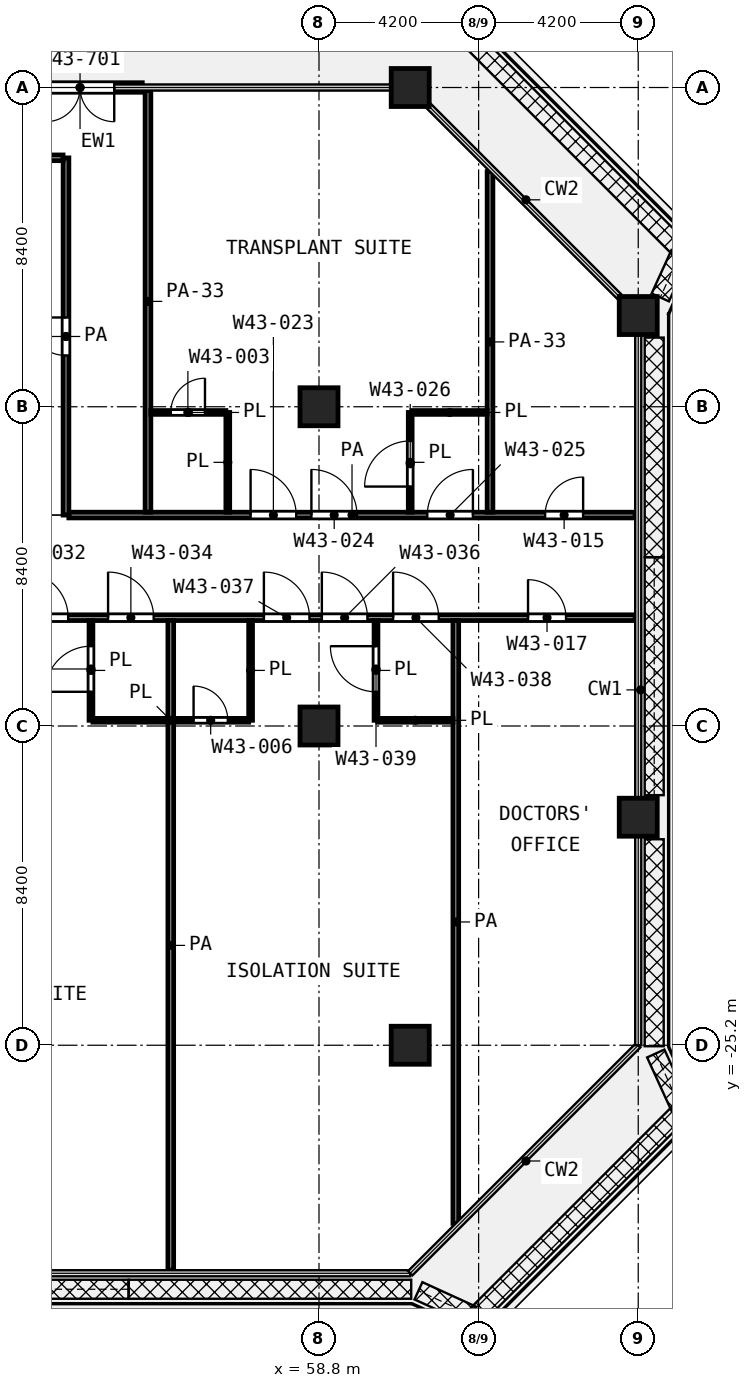
"""IFC4 building model, lengths in metres.
Left out: names, types, materials, properties, quantities, classifications, styles, units other than length and angle.
Written with IfcOpenShell. Run it as: python <this file> out.ifc"""

import sys

from ifc_helpers import new_model, si_unit, direction, frame, frame_2d, origin, origin_2d, place, context, subcontext, project, spatial, rectangle, extrude, element, fill, save


model = new_model("IFC4")
c1 = context("Model", 3, precision=1e-05, world=origin(), true_north=direction((0.0, 1.0)))
c2 = subcontext(c1, "Body", "Model", "MODEL_VIEW")
j1 = project(units=[si_unit("LENGTHUNIT", "METRE"), si_unit("PLANEANGLEUNIT", "RADIAN")], contexts=[c1])
p1 = place(None, origin())
s1 = spatial("IfcSite", under=j1, at=p1, CompositionType="ELEMENT")
p2 = place(p1, origin())
s2 = spatial("IfcBuilding", under=s1, at=p2, CompositionType="ELEMENT")
p3 = place(p2, frame((0.0, 0.0, 187.8)))
s3 = spatial("IfcBuildingStorey", under=s2, at=p3, CompositionType="ELEMENT", Elevation=187.8)
for number, where, z_axis, x_axis in (
    (1, (61.2, 0.0, 0.0), (0.0, 0.0, 1.0), (1.0, 0.0, 0.0)),
    (2, (67.2, -6.0, 0.0), (0.0, 0.0, 1.0), (1.0, 0.0, 0.0)),
    (3, (58.8, -8.4, 0.0), (0.0, 0.0, 1.0), (1.0, 0.0, 0.0)),
    (4, (58.8, -16.8, 0.0), (0.0, 0.0, 1.0), (1.0, 0.0, 0.0)),
    (5, (67.2, -19.2, 0.0), (0.0, 0.0, 1.0), (1.0, 0.0, 0.0)),
    (6, (61.2, -25.2, 0.0), (0.0, 0.0, 1.0), (1.0, 0.0, 0.0)),
):
    element("IfcColumn", number, at=place(p3, frame(where, z_axis=z_axis, x_axis=x_axis)), inside=s3, PredefinedType="COLUMN", context=c2, shape_type="SweptSolid", body=[
        extrude(rectangle(XDim=1.0, YDim=1.0, at=origin_2d()), origin(), (0.0, 0.0, 1.0), 4.2),
    ])
p4 = place(p3, frame((54.15, 0.0, 0.0), z_axis=(0.0, 0.0, 1.0), x_axis=(-1.0, 0.0, 0.0)))
e7 = element("IfcWall", 7, at=p4, inside=s3, PredefinedType="SOLIDWALL", context=c2, shape_type="SweptSolid", body=[
    extrude(rectangle(XDim=3.275, YDim=0.25, at=frame_2d((1.637, 0.0))), origin(), (0.0, 0.0, 1.0), 2.58),
])
p5 = place(p4, frame((0.738, 0.0, 0.0)))
e8 = element("IfcOpeningElement", 8, at=p5, cuts=e7, PredefinedType="OPENING", context=c2, shape_type="SweptSolid", body=[
    extrude(rectangle(XDim=1.8, YDim=2.1, at=frame_2d((0.9, 1.05))), frame((0.0, 0.135, 0.0), z_axis=(0.0, -1.0, 0.0), x_axis=(1.0, 0.0, 0.0)), (0.0, 0.0, 1.0), 0.27),
])
p6 = place(p3, frame((52.85, -16.65, 0.0), z_axis=(0.0, 0.0, 1.0), x_axis=(1.0, 0.0, 0.0)))
e9 = element("IfcWall", 9, at=p6, inside=s3, PredefinedType="PARTITIONING", context=c2, shape_type="SweptSolid", body=[
    extrude(rectangle(XDim=4.1, YDim=0.1, at=frame_2d((2.05, 0.0))), origin(), (0.0, 0.0, 1.0), 3.6),
])
p7 = place(p6, frame((2.65, 0.0, 0.0)))
e10 = element("IfcOpeningElement", 10, at=p7, cuts=e9, PredefinedType="OPENING", context=c2, shape_type="SweptSolid", body=[
    extrude(rectangle(XDim=0.9, YDim=2.1, at=frame_2d((0.45, 1.05))), frame((0.0, 0.06, 0.0), z_axis=(0.0, -1.0, 0.0), x_axis=(1.0, 0.0, 0.0)), (0.0, 0.0, 1.0), 0.12),
])
p8 = place(p3, frame((60.35, -16.65, 0.0), z_axis=(0.0, 0.0, 1.0), x_axis=(1.0, 0.0, 0.0)))
e11 = element("IfcWall", 11, at=p8, inside=s3, PredefinedType="PARTITIONING", context=c2, shape_type="SweptSolid", body=[
    extrude(rectangle(XDim=1.975, YDim=0.1, at=frame_2d((0.987, 0.0))), origin(), (0.0, 0.0, 1.0), 3.6),
])
p9 = place(p3, frame((54.375, -8.55, 0.0), z_axis=(0.0, 0.0, 1.0), x_axis=(1.0, 0.0, 0.0)))
e12 = element("IfcWall", 12, at=p9, inside=s3, PredefinedType="PARTITIONING", context=c2, shape_type="SweptSolid", body=[
    extrude(rectangle(XDim=1.975, YDim=0.1, at=frame_2d((0.988, 0.0))), origin(), (0.0, 0.0, 1.0), 3.6),
])
p10 = place(p9, frame((0.525, 0.0, 0.0)))
e13 = element("IfcOpeningElement", 13, at=p10, cuts=e12, PredefinedType="OPENING", context=c2, shape_type="SweptSolid", body=[
    extrude(rectangle(XDim=0.9, YDim=2.1, at=frame_2d((0.45, 1.05))), frame((0.0, 0.06, 0.0), z_axis=(0.0, -1.0, 0.0), x_axis=(1.0, 0.0, 0.0)), (0.0, 0.0, 1.0), 0.12),
])
p11 = place(p3, frame((61.25, -8.55, 0.0), z_axis=(0.0, 0.0, 1.0), x_axis=(1.0, 0.0, 0.0)))
e14 = element("IfcWall", 14, at=p11, inside=s3, PredefinedType="PARTITIONING", context=c2, shape_type="SweptSolid", body=[
    extrude(rectangle(XDim=1.975, YDim=0.1, at=frame_2d((0.988, 0.0))), origin(), (0.0, 0.0, 1.0), 3.6),
])
p12 = place(p3, frame((52.8, -16.65, 0.0), z_axis=(0.0, 0.0, 1.0), x_axis=(0.0, 1.0, 0.0)))
e15 = element("IfcWall", 15, at=p12, inside=s3, PredefinedType="PARTITIONING", context=c2, shape_type="SweptSolid", body=[
    extrude(rectangle(XDim=2.625, YDim=0.1, at=frame_2d((1.312, 0.0))), origin(), (0.0, 0.0, 1.0), 3.6),
])
p13 = place(p12, frame((0.75, 0.0, 0.0)))
e16 = element("IfcOpeningElement", 16, at=p13, cuts=e15, PredefinedType="OPENING", context=c2, shape_type="SweptSolid", body=[
    extrude(rectangle(XDim=1.2, YDim=2.1, at=frame_2d((0.6, 1.05))), frame((0.0, 0.06, 0.0), z_axis=(0.0, -1.0, 0.0), x_axis=(1.0, 0.0, 0.0)), (0.0, 0.0, 1.0), 0.12),
])
for number, where, z_axis, x_axis in (
    (17, (56.4, -11.175, 0.0), (0.0, 0.0, 1.0), (0.0, 1.0, 0.0)),
    (18, (57.0, -16.65, 0.0), (0.0, 0.0, 1.0), (0.0, 1.0, 0.0)),
):
    element("IfcWall", number, at=place(p3, frame(where, z_axis=z_axis, x_axis=x_axis)), inside=s3, PredefinedType="PARTITIONING", context=c2, shape_type="SweptSolid", body=[
        extrude(rectangle(XDim=2.625, YDim=0.1, at=frame_2d((1.312, 0.0))), origin(), (0.0, 0.0, 1.0), 3.6),
    ])
p14 = place(p3, frame((60.3, -16.65, 0.0), z_axis=(0.0, 0.0, 1.0), x_axis=(0.0, 1.0, 0.0)))
e19 = element("IfcWall", 19, at=p14, inside=s3, PredefinedType="PARTITIONING", context=c2, shape_type="SweptSolid", body=[
    extrude(rectangle(XDim=2.625, YDim=0.1, at=frame_2d((1.312, 0.0))), origin(), (0.0, 0.0, 1.0), 3.6),
])
p15 = place(p14, frame((0.75, 0.0, 0.0)))
e20 = element("IfcOpeningElement", 20, at=p15, cuts=e19, PredefinedType="OPENING", context=c2, shape_type="SweptSolid", body=[
    extrude(rectangle(XDim=1.2, YDim=2.1, at=frame_2d((0.6, 1.05))), frame((0.0, 0.06, 0.0), z_axis=(0.0, -1.0, 0.0), x_axis=(1.0, 0.0, 0.0)), (0.0, 0.0, 1.0), 0.12),
])
p16 = place(p3, frame((61.2, -11.175, 0.0), z_axis=(0.0, 0.0, 1.0), x_axis=(0.0, 1.0, 0.0)))
e21 = element("IfcWall", 21, at=p16, inside=s3, PredefinedType="PARTITIONING", context=c2, shape_type="SweptSolid", body=[
    extrude(rectangle(XDim=2.625, YDim=0.1, at=frame_2d((1.312, 0.0))), origin(), (0.0, 0.0, 1.0), 3.6),
])
p17 = place(p16, frame((0.675, 0.0, 0.0)))
e22 = element("IfcOpeningElement", 22, at=p17, cuts=e21, PredefinedType="OPENING", context=c2, shape_type="SweptSolid", body=[
    extrude(rectangle(XDim=1.2, YDim=2.1, at=frame_2d((0.6, 1.05))), frame((0.0, 0.06, 0.0), z_axis=(0.0, -1.0, 0.0), x_axis=(1.0, 0.0, 0.0)), (0.0, 0.0, 1.0), 0.12),
])
p18 = place(p3, frame((29.4, -13.95, 0.0), z_axis=(0.0, 0.0, 1.0), x_axis=(1.0, 0.0, 0.0)))
e23 = element("IfcWall", 23, at=p18, inside=s3, PredefinedType="PARTITIONING", context=c2, shape_type="SweptSolid", body=[
    extrude(rectangle(XDim=37.72, YDim=0.15, at=frame_2d((18.86, 0.0))), origin(), (0.0, 0.0, 1.0), 3.6),
])
p19 = place(p18, frame((1.6, 0.0, 0.0)))
e24 = element("IfcOpeningElement", 24, at=p19, cuts=e23, PredefinedType="OPENING", context=c2, shape_type="SweptSolid", body=[
    extrude(rectangle(XDim=1.0, YDim=2.1, at=frame_2d((0.5, 1.05))), frame((0.0, 0.085, 0.0), z_axis=(0.0, -1.0, 0.0), x_axis=(1.0, 0.0, 0.0)), (0.0, 0.0, 1.0), 0.17),
])
p20 = place(p18, frame((6.0, 0.0, 0.0)))
e25 = element("IfcOpeningElement", 25, at=p20, cuts=e23, PredefinedType="OPENING", context=c2, shape_type="SweptSolid", body=[
    extrude(rectangle(XDim=1.2, YDim=2.1, at=frame_2d((0.6, 1.05))), frame((0.0, 0.085, 0.0), z_axis=(0.0, -1.0, 0.0), x_axis=(1.0, 0.0, 0.0)), (0.0, 0.0, 1.0), 0.17),
])
p21 = place(p18, frame((12.975, 0.0, 0.0)))
e26 = element("IfcOpeningElement", 26, at=p21, cuts=e23, PredefinedType="OPENING", context=c2, shape_type="SweptSolid", body=[
    extrude(rectangle(XDim=1.2, YDim=2.1, at=frame_2d((0.6, 1.05))), frame((0.0, 0.085, 0.0), z_axis=(0.0, -1.0, 0.0), x_axis=(1.0, 0.0, 0.0)), (0.0, 0.0, 1.0), 0.17),
])
p22 = place(p18, frame((11.45, 0.0, 0.0)))
e27 = element("IfcOpeningElement", 27, at=p22, cuts=e23, PredefinedType="OPENING", context=c2, shape_type="SweptSolid", body=[
    extrude(rectangle(XDim=1.2, YDim=2.1, at=frame_2d((0.6, 1.05))), frame((0.0, 0.085, 0.0), z_axis=(0.0, -1.0, 0.0), x_axis=(1.0, 0.0, 0.0)), (0.0, 0.0, 1.0), 0.17),
])
p23 = place(p18, frame((14.85, 0.0, 0.0)))
e28 = element("IfcOpeningElement", 28, at=p23, cuts=e23, PredefinedType="OPENING", context=c2, shape_type="SweptSolid", body=[
    extrude(rectangle(XDim=1.2, YDim=2.1, at=frame_2d((0.6, 1.05))), frame((0.0, 0.085, 0.0), z_axis=(0.0, -1.0, 0.0), x_axis=(1.0, 0.0, 0.0)), (0.0, 0.0, 1.0), 0.17),
])
p24 = place(p18, frame((21.6, 0.0, 0.0)))
e29 = element("IfcOpeningElement", 29, at=p24, cuts=e23, PredefinedType="OPENING", context=c2, shape_type="SweptSolid", body=[
    extrude(rectangle(XDim=1.2, YDim=2.1, at=frame_2d((0.6, 1.05))), frame((0.0, 0.085, 0.0), z_axis=(0.0, -1.0, 0.0), x_axis=(1.0, 0.0, 0.0)), (0.0, 0.0, 1.0), 0.17),
])
p25 = place(p18, frame((20.1, 0.0, 0.0)))
e30 = element("IfcOpeningElement", 30, at=p25, cuts=e23, PredefinedType="OPENING", context=c2, shape_type="SweptSolid", body=[
    extrude(rectangle(XDim=1.2, YDim=2.1, at=frame_2d((0.6, 1.05))), frame((0.0, 0.085, 0.0), z_axis=(0.0, -1.0, 0.0), x_axis=(1.0, 0.0, 0.0)), (0.0, 0.0, 1.0), 0.17),
])
p26 = place(p18, frame((18.85, 0.0, 0.0)))
e31 = element("IfcOpeningElement", 31, at=p26, cuts=e23, PredefinedType="OPENING", context=c2, shape_type="SweptSolid", body=[
    extrude(rectangle(XDim=0.9, YDim=2.1, at=frame_2d((0.45, 1.05))), frame((0.0, 0.085, 0.0), z_axis=(0.0, -1.0, 0.0), x_axis=(1.0, 0.0, 0.0)), (0.0, 0.0, 1.0), 0.17),
])
p27 = place(p18, frame((23.85, 0.0, 0.0)))
e32 = element("IfcOpeningElement", 32, at=p27, cuts=e23, PredefinedType="OPENING", context=c2, shape_type="SweptSolid", body=[
    extrude(rectangle(XDim=1.2, YDim=2.1, at=frame_2d((0.6, 1.05))), frame((0.0, 0.085, 0.0), z_axis=(0.0, -1.0, 0.0), x_axis=(1.0, 0.0, 0.0)), (0.0, 0.0, 1.0), 0.17),
])
p28 = place(p18, frame((29.475, 0.0, 0.0)))
e33 = element("IfcOpeningElement", 33, at=p28, cuts=e23, PredefinedType="OPENING", context=c2, shape_type="SweptSolid", body=[
    extrude(rectangle(XDim=1.2, YDim=2.1, at=frame_2d((0.6, 1.05))), frame((0.0, 0.085, 0.0), z_axis=(0.0, -1.0, 0.0), x_axis=(1.0, 0.0, 0.0)), (0.0, 0.0, 1.0), 0.17),
])
p29 = place(p18, frame((27.95, 0.0, 0.0)))
e34 = element("IfcOpeningElement", 34, at=p29, cuts=e23, PredefinedType="OPENING", context=c2, shape_type="SweptSolid", body=[
    extrude(rectangle(XDim=1.2, YDim=2.1, at=frame_2d((0.6, 1.05))), frame((0.0, 0.085, 0.0), z_axis=(0.0, -1.0, 0.0), x_axis=(1.0, 0.0, 0.0)), (0.0, 0.0, 1.0), 0.17),
])
p30 = place(p18, frame((31.35, 0.0, 0.0)))
e35 = element("IfcOpeningElement", 35, at=p30, cuts=e23, PredefinedType="OPENING", context=c2, shape_type="SweptSolid", body=[
    extrude(rectangle(XDim=1.2, YDim=2.1, at=frame_2d((0.6, 1.05))), frame((0.0, 0.085, 0.0), z_axis=(0.0, -1.0, 0.0), x_axis=(1.0, 0.0, 0.0)), (0.0, 0.0, 1.0), 0.17),
])
p31 = place(p18, frame((34.9, 0.0, 0.0)))
e36 = element("IfcOpeningElement", 36, at=p31, cuts=e23, PredefinedType="OPENING", context=c2, shape_type="SweptSolid", body=[
    extrude(rectangle(XDim=1.0, YDim=2.1, at=frame_2d((0.5, 1.05))), frame((0.0, 0.085, 0.0), z_axis=(0.0, -1.0, 0.0), x_axis=(1.0, 0.0, 0.0)), (0.0, 0.0, 1.0), 0.17),
])
p32 = place(p3, frame((52.218, -11.25, 0.0), z_axis=(0.0, 0.0, 1.0), x_axis=(1.0, 0.0, 0.0)))
e37 = element("IfcWall", 37, at=p32, inside=s3, PredefinedType="PARTITIONING", context=c2, shape_type="SweptSolid", body=[
    extrude(rectangle(XDim=14.902, YDim=0.15, at=frame_2d((7.451, 0.0))), origin(), (0.0, 0.0, 1.0), 3.6),
])
p33 = place(p32, frame((4.782, 0.0, 0.0)))
e38 = element("IfcOpeningElement", 38, at=p33, cuts=e37, PredefinedType="OPENING", context=c2, shape_type="SweptSolid", body=[
    extrude(rectangle(XDim=1.2, YDim=2.1, at=frame_2d((0.6, 1.05))), frame((0.0, 0.085, 0.0), z_axis=(0.0, -1.0, 0.0), x_axis=(1.0, 0.0, 0.0)), (0.0, 0.0, 1.0), 0.17),
])
p34 = place(p32, frame((6.382, 0.0, 0.0)))
e39 = element("IfcOpeningElement", 39, at=p34, cuts=e37, PredefinedType="OPENING", context=c2, shape_type="SweptSolid", body=[
    extrude(rectangle(XDim=1.2, YDim=2.1, at=frame_2d((0.6, 1.05))), frame((0.0, 0.085, 0.0), z_axis=(0.0, -1.0, 0.0), x_axis=(1.0, 0.0, 0.0)), (0.0, 0.0, 1.0), 0.17),
])
p35 = place(p32, frame((9.432, 0.0, 0.0)))
e40 = element("IfcOpeningElement", 40, at=p35, cuts=e37, PredefinedType="OPENING", context=c2, shape_type="SweptSolid", body=[
    extrude(rectangle(XDim=1.2, YDim=2.1, at=frame_2d((0.6, 1.05))), frame((0.0, 0.085, 0.0), z_axis=(0.0, -1.0, 0.0), x_axis=(1.0, 0.0, 0.0)), (0.0, 0.0, 1.0), 0.17),
])
p36 = place(p32, frame((12.532, 0.0, 0.0)))
e41 = element("IfcOpeningElement", 41, at=p36, cuts=e37, PredefinedType="OPENING", context=c2, shape_type="SweptSolid", body=[
    extrude(rectangle(XDim=1.0, YDim=2.1, at=frame_2d((0.5, 1.05))), frame((0.0, 0.085, 0.0), z_axis=(0.0, -1.0, 0.0), x_axis=(1.0, 0.0, 0.0)), (0.0, 0.0, 1.0), 0.17),
])
p37 = place(p3, frame((48.6, -1.85, 0.0), z_axis=(0.0, 0.0, 1.0), x_axis=(1.0, 0.0, 0.0)))
e42 = element("IfcWall", 42, at=p37, inside=s3, PredefinedType="PARTITIONING", context=c2, shape_type="SweptSolid", body=[
    extrude(rectangle(XDim=3.466, YDim=0.15, at=frame_2d((1.733, 0.0))), origin(), (0.0, 0.0, 1.0), 3.6),
])
p38 = place(p3, frame((52.143, -11.25, 0.0), z_axis=(0.0, 0.0, 1.0), x_axis=(0.0, 1.0, 0.0)))
e43 = element("IfcWall", 43, at=p38, inside=s3, PredefinedType="PARTITIONING", context=c2, shape_type="SweptSolid", body=[
    extrude(rectangle(XDim=9.398, YDim=0.15, at=frame_2d((4.699, 0.0))), origin(), (0.0, 0.0, 1.0), 3.6),
])
p39 = place(p38, frame((4.199, 0.0, 0.0)))
e44 = element("IfcOpeningElement", 44, at=p39, cuts=e43, PredefinedType="OPENING", context=c2, shape_type="SweptSolid", body=[
    extrude(rectangle(XDim=1.0, YDim=2.1, at=frame_2d((0.5, 1.05))), frame((0.0, 0.085, 0.0), z_axis=(0.0, -1.0, 0.0), x_axis=(1.0, 0.0, 0.0)), (0.0, 0.0, 1.0), 0.17),
])
p40 = place(p3, frame((54.3, -11.175, 0.0), z_axis=(0.0, 0.0, 1.0), x_axis=(0.0, 1.0, 0.0)))
e45 = element("IfcWall", 45, at=p40, inside=s3, PredefinedType="PARTITIONING", context=c2, shape_type="SweptSolid", body=[
    extrude(rectangle(XDim=11.095, YDim=0.15, at=frame_2d((5.547, 0.0))), origin(), (0.0, 0.0, 1.0), 2.7),
])
p41 = place(p3, frame((54.9, -31.12, 0.0), z_axis=(0.0, 0.0, 1.0), x_axis=(0.0, 1.0, 0.0)))
e46 = element("IfcWall", 46, at=p41, inside=s3, PredefinedType="PARTITIONING", context=c2, shape_type="SweptSolid", body=[
    extrude(rectangle(XDim=17.095, YDim=0.15, at=frame_2d((8.548, 0.0))), origin(), (0.0, 0.0, 1.0), 3.6),
])
p42 = place(p3, frame((62.4, -29.887, 0.0), z_axis=(0.0, 0.0, 1.0), x_axis=(0.0, 1.0, 0.0)))
e47 = element("IfcWall", 47, at=p42, inside=s3, PredefinedType="PARTITIONING", context=c2, shape_type="SweptSolid", body=[
    extrude(rectangle(XDim=15.862, YDim=0.15, at=frame_2d((7.931, 0.0))), origin(), (0.0, 0.0, 1.0), 3.6),
])
p43 = place(p3, frame((63.3, -11.175, 0.0), z_axis=(0.0, 0.0, 1.0), x_axis=(0.0, 1.0, 0.0)))
e48 = element("IfcWall", 48, at=p43, inside=s3, PredefinedType="PARTITIONING", context=c2, shape_type="SweptSolid", body=[
    extrude(rectangle(XDim=8.962, YDim=0.15, at=frame_2d((4.481, 0.0))), origin(), (0.0, 0.0, 1.0), 2.7),
])
p44 = place(p5, origin())
e49 = element("IfcDoor", 49, at=p44, inside=s3, OperationType="DOUBLE_DOOR_SINGLE_SWING", PredefinedType="DOOR", context=c2, shape_type="SweptSolid", body=[
    extrude(rectangle(XDim=1.8, YDim=2.1, at=frame_2d((0.9, 1.05))), frame((0.0, 0.025, 0.0), z_axis=(0.0, -1.0, 0.0), x_axis=(1.0, 0.0, 0.0)), (0.0, 0.0, 1.0), 0.05),
])
fill(e8, e49)
p45 = place(p39, origin())
e50 = element("IfcDoor", 50, at=p45, inside=s3, OperationType="SINGLE_SWING_RIGHT", PredefinedType="DOOR", context=c2, shape_type="SweptSolid", body=[
    extrude(rectangle(XDim=1.0, YDim=2.1, at=frame_2d((0.5, 1.05))), frame((0.0, 0.025, 0.0), z_axis=(0.0, -1.0, 0.0), x_axis=(1.0, 0.0, 0.0)), (0.0, 0.0, 1.0), 0.05),
])
fill(e44, e50)
p46 = place(p33, origin())
e51 = element("IfcDoor", 51, at=p46, inside=s3, OperationType="SINGLE_SWING_LEFT", PredefinedType="DOOR", context=c2, shape_type="SweptSolid", body=[
    extrude(rectangle(XDim=1.2, YDim=2.1, at=frame_2d((0.6, 1.05))), frame((0.0, 0.025, 0.0), z_axis=(0.0, -1.0, 0.0), x_axis=(1.0, 0.0, 0.0)), (0.0, 0.0, 1.0), 0.05),
])
fill(e38, e51)
p47 = place(p34, origin())
e52 = element("IfcDoor", 52, at=p47, inside=s3, OperationType="SINGLE_SWING_LEFT", PredefinedType="DOOR", context=c2, shape_type="SweptSolid", body=[
    extrude(rectangle(XDim=1.2, YDim=2.1, at=frame_2d((0.6, 1.05))), frame((0.0, 0.025, 0.0), z_axis=(0.0, -1.0, 0.0), x_axis=(1.0, 0.0, 0.0)), (0.0, 0.0, 1.0), 0.05),
])
fill(e39, e52)
p48 = place(p35, origin())
e53 = element("IfcDoor", 53, at=p48, inside=s3, OperationType="SINGLE_SWING_RIGHT", PredefinedType="DOOR", context=c2, shape_type="SweptSolid", body=[
    extrude(rectangle(XDim=1.2, YDim=2.1, at=frame_2d((0.6, 1.05))), frame((0.0, 0.025, 0.0), z_axis=(0.0, -1.0, 0.0), x_axis=(1.0, 0.0, 0.0)), (0.0, 0.0, 1.0), 0.05),
])
fill(e40, e53)
p49 = place(p17, origin())
e54 = element("IfcDoor", 54, at=p49, inside=s3, OperationType="SINGLE_SWING_LEFT", PredefinedType="DOOR", context=c2, shape_type="SweptSolid", body=[
    extrude(rectangle(XDim=1.2, YDim=2.1, at=frame_2d((0.6, 1.05))), frame((0.0, 0.025, 0.0), z_axis=(0.0, -1.0, 0.0), x_axis=(1.0, 0.0, 0.0)), (0.0, 0.0, 1.0), 0.05),
])
fill(e22, e54)
p50 = place(p10, origin())
e55 = element("IfcDoor", 55, at=p50, inside=s3, OperationType="SINGLE_SWING_RIGHT", PredefinedType="DOOR", context=c2, shape_type="SweptSolid", body=[
    extrude(rectangle(XDim=0.9, YDim=2.1, at=frame_2d((0.45, 1.05))), frame((0.0, 0.025, 0.0), z_axis=(0.0, -1.0, 0.0), x_axis=(1.0, 0.0, 0.0)), (0.0, 0.0, 1.0), 0.05),
])
fill(e13, e55)
p51 = place(p36, origin())
e56 = element("IfcDoor", 56, at=p51, inside=s3, OperationType="SINGLE_SWING_RIGHT", PredefinedType="DOOR", context=c2, shape_type="SweptSolid", body=[
    extrude(rectangle(XDim=1.0, YDim=2.1, at=frame_2d((0.5, 1.05))), frame((0.0, 0.025, 0.0), z_axis=(0.0, -1.0, 0.0), x_axis=(1.0, 0.0, 0.0)), (0.0, 0.0, 1.0), 0.05),
])
fill(e41, e56)
p52 = place(p24, origin())
e57 = element("IfcDoor", 57, at=p52, inside=s3, OperationType="SINGLE_SWING_LEFT", PredefinedType="DOOR", context=c2, shape_type="SweptSolid", body=[
    extrude(rectangle(XDim=1.2, YDim=2.1, at=frame_2d((0.6, 1.05))), frame((0.0, 0.025, 0.0), z_axis=(0.0, -1.0, 0.0), x_axis=(1.0, 0.0, 0.0)), (0.0, 0.0, 1.0), 0.05),
])
fill(e29, e57)
p53 = place(p27, origin())
e58 = element("IfcDoor", 58, at=p53, inside=s3, OperationType="SINGLE_SWING_LEFT", PredefinedType="DOOR", context=c2, shape_type="SweptSolid", body=[
    extrude(rectangle(XDim=1.2, YDim=2.1, at=frame_2d((0.6, 1.05))), frame((0.0, 0.025, 0.0), z_axis=(0.0, -1.0, 0.0), x_axis=(1.0, 0.0, 0.0)), (0.0, 0.0, 1.0), 0.05),
])
fill(e32, e58)
p54 = place(p13, origin())
e59 = element("IfcDoor", 59, at=p54, inside=s3, OperationType="SINGLE_SWING_LEFT", PredefinedType="DOOR", context=c2, shape_type="SweptSolid", body=[
    extrude(rectangle(XDim=1.2, YDim=2.1, at=frame_2d((0.6, 1.05))), frame((0.0, 0.025, 0.0), z_axis=(0.0, -1.0, 0.0), x_axis=(1.0, 0.0, 0.0)), (0.0, 0.0, 1.0), 0.05),
])
fill(e16, e59)
p55 = place(p28, origin())
e60 = element("IfcDoor", 60, at=p55, inside=s3, OperationType="SINGLE_SWING_LEFT", PredefinedType="DOOR", context=c2, shape_type="SweptSolid", body=[
    extrude(rectangle(XDim=1.2, YDim=2.1, at=frame_2d((0.6, 1.05))), frame((0.0, 0.025, 0.0), z_axis=(0.0, -1.0, 0.0), x_axis=(1.0, 0.0, 0.0)), (0.0, 0.0, 1.0), 0.05),
])
fill(e33, e60)
p56 = place(p29, origin())
e61 = element("IfcDoor", 61, at=p56, inside=s3, OperationType="SINGLE_SWING_LEFT", PredefinedType="DOOR", context=c2, shape_type="SweptSolid", body=[
    extrude(rectangle(XDim=1.2, YDim=2.1, at=frame_2d((0.6, 1.05))), frame((0.0, 0.025, 0.0), z_axis=(0.0, -1.0, 0.0), x_axis=(1.0, 0.0, 0.0)), (0.0, 0.0, 1.0), 0.05),
])
fill(e34, e61)
p57 = place(p30, origin())
e62 = element("IfcDoor", 62, at=p57, inside=s3, OperationType="SINGLE_SWING_LEFT", PredefinedType="DOOR", context=c2, shape_type="SweptSolid", body=[
    extrude(rectangle(XDim=1.2, YDim=2.1, at=frame_2d((0.6, 1.05))), frame((0.0, 0.025, 0.0), z_axis=(0.0, -1.0, 0.0), x_axis=(1.0, 0.0, 0.0)), (0.0, 0.0, 1.0), 0.05),
])
fill(e35, e62)
p58 = place(p15, origin())
e63 = element("IfcDoor", 63, at=p58, inside=s3, OperationType="SINGLE_SWING_RIGHT", PredefinedType="DOOR", context=c2, shape_type="SweptSolid", body=[
    extrude(rectangle(XDim=1.2, YDim=2.1, at=frame_2d((0.6, 1.05))), frame((0.0, 0.025, 0.0), z_axis=(0.0, -1.0, 0.0), x_axis=(1.0, 0.0, 0.0)), (0.0, 0.0, 1.0), 0.05),
])
fill(e20, e63)
p59 = place(p7, origin())
e64 = element("IfcDoor", 64, at=p59, inside=s3, OperationType="SINGLE_SWING_LEFT", PredefinedType="DOOR", context=c2, shape_type="SweptSolid", body=[
    extrude(rectangle(XDim=0.9, YDim=2.1, at=frame_2d((0.45, 1.05))), frame((0.0, 0.025, 0.0), z_axis=(0.0, -1.0, 0.0), x_axis=(1.0, 0.0, 0.0)), (0.0, 0.0, 1.0), 0.05),
])
fill(e10, e64)
p60 = place(p31, origin())
e65 = element("IfcDoor", 65, at=p60, inside=s3, OperationType="SINGLE_SWING_LEFT", PredefinedType="DOOR", context=c2, shape_type="SweptSolid", body=[
    extrude(rectangle(XDim=1.0, YDim=2.1, at=frame_2d((0.5, 1.05))), frame((0.0, 0.025, 0.0), z_axis=(0.0, -1.0, 0.0), x_axis=(1.0, 0.0, 0.0)), (0.0, 0.0, 1.0), 0.05),
])
fill(e36, e65)
save(model, sys.argv[1])
